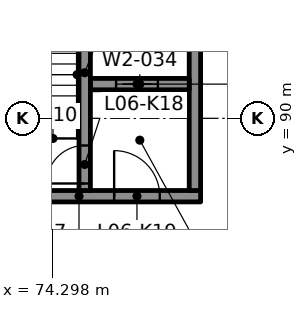
"""IFC4 building model, lengths in metres.
Left out: names, types, materials, properties, quantities, classifications, styles, units other than length and angle.
Written with IfcOpenShell. Run it as: python <this file> out.ifc"""

import sys

from ifc_helpers import new_model, si_unit, direction, frame, frame_2d, origin, place, context, subcontext, project, spatial, rectangle, extrude, element, fill, save


model = new_model("IFC4")
c1 = context("Model", 3, precision=1e-05, world=origin(), true_north=direction((0.0, 1.0)))
c2 = subcontext(c1, "Body", "Model", "MODEL_VIEW")
j1 = project(units=[si_unit("LENGTHUNIT", "METRE"), si_unit("PLANEANGLEUNIT", "RADIAN")], contexts=[c1])
p1 = place(None, origin())
s1 = spatial("IfcSite", under=j1, at=p1, CompositionType="ELEMENT")
p2 = place(p1, origin())
s2 = spatial("IfcBuilding", under=s1, at=p2, CompositionType="ELEMENT")
p3 = place(p2, frame((0.0, 0.0, 31.0)))
s3 = spatial("IfcBuildingStorey", under=s2, at=p3, CompositionType="ELEMENT", Elevation=31.0)
p4 = place(p3, frame((71.8, 87.95, 0.0), z_axis=(0.0, 0.0, 1.0), x_axis=(1.0, 0.0, 0.0)))
e1 = element("IfcWall", 1, at=p4, inside=s3, PredefinedType="SHEAR", context=c2, shape_type="SweptSolid", body=[
    extrude(rectangle(XDim=6.4, YDim=0.3, at=frame_2d((3.2, 0.0))), origin(), (0.0, 0.0, 1.0), 4.05),
])
p5 = place(p4, frame((1.325, 0.0, 0.0)))
e2 = element("IfcOpeningElement", 2, at=p5, cuts=e1, PredefinedType="OPENING", context=c2, shape_type="SweptSolid", body=[
    extrude(rectangle(XDim=1.0, YDim=2.1, at=frame_2d((0.5, 1.05))), frame((0.0, 0.16, 0.0), z_axis=(0.0, -1.0, 0.0), x_axis=(1.0, 0.0, 0.0)), (0.0, 0.0, 1.0), 0.32),
])
p6 = place(p4, frame((4.125, 0.0, 0.0)))
e3 = element("IfcOpeningElement", 3, at=p6, cuts=e1, PredefinedType="OPENING", context=c2, shape_type="SweptSolid", body=[
    extrude(rectangle(XDim=1.2, YDim=2.1, at=frame_2d((0.6, 1.05))), frame((0.0, 0.16, 0.0), z_axis=(0.0, -1.0, 0.0), x_axis=(1.0, 0.0, 0.0)), (0.0, 0.0, 1.0), 0.32),
])
p7 = place(p3, frame((78.05, 88.1, 0.0), z_axis=(0.0, 0.0, 1.0), x_axis=(0.0, 1.0, 0.0)))
e4 = element("IfcWall", 4, at=p7, inside=s3, PredefinedType="SHEAR", context=c2, shape_type="SweptSolid", body=[
    extrude(rectangle(XDim=6.2, YDim=0.3, at=frame_2d((3.1, 0.0))), origin(), (0.0, 0.0, 1.0), 4.05),
])
p8 = place(p3, frame((75.3, 90.9, 0.0), z_axis=(0.0, 0.0, 1.0), x_axis=(1.0, 0.0, 0.0)))
e5 = element("IfcWall", 5, at=p8, inside=s3, PredefinedType="SHEAR", context=c2, shape_type="SweptSolid", body=[
    extrude(rectangle(XDim=2.6, YDim=0.3, at=frame_2d((1.3, 0.0))), origin(), (0.0, 0.0, 1.0), 4.05),
])
p9 = place(p8, frame((0.675, 0.0, 0.0)))
e6 = element("IfcOpeningElement", 6, at=p9, cuts=e5, PredefinedType="OPENING", context=c2, shape_type="SweptSolid", body=[
    extrude(rectangle(XDim=1.1, YDim=2.1, at=frame_2d((0.55, 1.05))), frame((0.0, 0.16, 0.0), z_axis=(0.0, -1.0, 0.0), x_axis=(1.0, 0.0, 0.0)), (0.0, 0.0, 1.0), 0.32),
])
p10 = place(p3, frame((75.15, 88.1, 0.0), z_axis=(0.0, 0.0, 1.0), x_axis=(0.0, 1.0, 0.0)))
e7 = element("IfcWall", 7, at=p10, inside=s3, PredefinedType="SHEAR", context=c2, shape_type="SweptSolid", body=[
    extrude(rectangle(XDim=6.2, YDim=0.3, at=frame_2d((3.1, 0.0))), origin(), (0.0, 0.0, 1.0), 4.05),
])
p11 = place(p10, frame((0.185, 0.0, 0.0)))
e8 = element("IfcOpeningElement", 8, at=p11, cuts=e7, PredefinedType="OPENING", context=c2, shape_type="SweptSolid", body=[
    extrude(rectangle(XDim=1.0, YDim=2.1, at=frame_2d((0.5, 1.05))), frame((0.0, 0.16, 0.0), z_axis=(0.0, -1.0, 0.0), x_axis=(1.0, 0.0, 0.0)), (0.0, 0.0, 1.0), 0.32),
])
p12 = place(p3, frame((107.504, 60.451, 0.0), z_axis=(0.0, 0.0, 1.0), x_axis=(-0.500000550228, 0.86602508611, 0.0)))
e9 = element("IfcWall", 9, at=p12, inside=s3, PredefinedType="SOLIDWALL", context=c2, shape_type="SweptSolid", body=[
    extrude(rectangle(XDim=57.704, YDim=0.3, at=frame_2d((28.852, 0.0))), origin(), (0.0, 0.0, 1.0), 4.05),
])
p13 = place(p12, frame((0.89, 0.0, 0.8)))
e10 = element("IfcOpeningElement", 10, at=p13, cuts=e9, PredefinedType="OPENING", context=c2, shape_type="SweptSolid", body=[
    extrude(rectangle(XDim=3.0, YDim=2.4, at=frame_2d((1.5, 1.2))), frame((0.0, 0.16, 0.0), z_axis=(0.0, -1.0, 0.0), x_axis=(1.0, 0.0, 0.0)), (0.0, 0.0, 1.0), 0.32),
])
p14 = place(p12, frame((4.67, 0.0, 0.8)))
e11 = element("IfcOpeningElement", 11, at=p14, cuts=e9, PredefinedType="OPENING", context=c2, shape_type="SweptSolid", body=[
    extrude(rectangle(XDim=3.0, YDim=2.4, at=frame_2d((1.5, 1.2))), frame((0.0, 0.16, 0.0), z_axis=(0.0, -1.0, 0.0), x_axis=(1.0, 0.0, 0.0)), (0.0, 0.0, 1.0), 0.32),
])
p15 = place(p12, frame((8.451, 0.0, 0.8)))
e12 = element("IfcOpeningElement", 12, at=p15, cuts=e9, PredefinedType="OPENING", context=c2, shape_type="SweptSolid", body=[
    extrude(rectangle(XDim=3.0, YDim=2.4, at=frame_2d((1.5, 1.2))), frame((0.0, 0.16, 0.0), z_axis=(0.0, -1.0, 0.0), x_axis=(1.0, 0.0, 0.0)), (0.0, 0.0, 1.0), 0.32),
])
p16 = place(p12, frame((12.231, 0.0, 0.8)))
e13 = element("IfcOpeningElement", 13, at=p16, cuts=e9, PredefinedType="OPENING", context=c2, shape_type="SweptSolid", body=[
    extrude(rectangle(XDim=3.0, YDim=2.4, at=frame_2d((1.5, 1.2))), frame((0.0, 0.16, 0.0), z_axis=(0.0, -1.0, 0.0), x_axis=(1.0, 0.0, 0.0)), (0.0, 0.0, 1.0), 0.32),
])
p17 = place(p12, frame((16.011, 0.0, 0.8)))
e14 = element("IfcOpeningElement", 14, at=p17, cuts=e9, PredefinedType="OPENING", context=c2, shape_type="SweptSolid", body=[
    extrude(rectangle(XDim=3.0, YDim=2.4, at=frame_2d((1.5, 1.2))), frame((0.0, 0.16, 0.0), z_axis=(0.0, -1.0, 0.0), x_axis=(1.0, 0.0, 0.0)), (0.0, 0.0, 1.0), 0.32),
])
p18 = place(p12, frame((19.792, 0.0, 0.8)))
e15 = element("IfcOpeningElement", 15, at=p18, cuts=e9, PredefinedType="OPENING", context=c2, shape_type="SweptSolid", body=[
    extrude(rectangle(XDim=3.0, YDim=2.4, at=frame_2d((1.5, 1.2))), frame((0.0, 0.16, 0.0), z_axis=(0.0, -1.0, 0.0), x_axis=(1.0, 0.0, 0.0)), (0.0, 0.0, 1.0), 0.32),
])
p19 = place(p12, frame((23.572, 0.0, 0.8)))
e16 = element("IfcOpeningElement", 16, at=p19, cuts=e9, PredefinedType="OPENING", context=c2, shape_type="SweptSolid", body=[
    extrude(rectangle(XDim=3.0, YDim=2.4, at=frame_2d((1.5, 1.2))), frame((0.0, 0.16, 0.0), z_axis=(0.0, -1.0, 0.0), x_axis=(1.0, 0.0, 0.0)), (0.0, 0.0, 1.0), 0.32),
])
p20 = place(p12, frame((27.352, 0.0, 0.8)))
e17 = element("IfcOpeningElement", 17, at=p20, cuts=e9, PredefinedType="OPENING", context=c2, shape_type="SweptSolid", body=[
    extrude(rectangle(XDim=3.0, YDim=2.4, at=frame_2d((1.5, 1.2))), frame((0.0, 0.16, 0.0), z_axis=(0.0, -1.0, 0.0), x_axis=(1.0, 0.0, 0.0)), (0.0, 0.0, 1.0), 0.32),
])
p21 = place(p12, frame((31.132, 0.0, 0.8)))
e18 = element("IfcOpeningElement", 18, at=p21, cuts=e9, PredefinedType="OPENING", context=c2, shape_type="SweptSolid", body=[
    extrude(rectangle(XDim=3.0, YDim=2.4, at=frame_2d((1.5, 1.2))), frame((0.0, 0.16, 0.0), z_axis=(0.0, -1.0, 0.0), x_axis=(1.0, 0.0, 0.0)), (0.0, 0.0, 1.0), 0.32),
])
p22 = place(p12, frame((34.913, 0.0, 0.8)))
e19 = element("IfcOpeningElement", 19, at=p22, cuts=e9, PredefinedType="OPENING", context=c2, shape_type="SweptSolid", body=[
    extrude(rectangle(XDim=3.0, YDim=2.4, at=frame_2d((1.5, 1.2))), frame((0.0, 0.16, 0.0), z_axis=(0.0, -1.0, 0.0), x_axis=(1.0, 0.0, 0.0)), (0.0, 0.0, 1.0), 0.32),
])
p23 = place(p12, frame((38.693, 0.0, 0.8)))
e20 = element("IfcOpeningElement", 20, at=p23, cuts=e9, PredefinedType="OPENING", context=c2, shape_type="SweptSolid", body=[
    extrude(rectangle(XDim=3.0, YDim=2.4, at=frame_2d((1.5, 1.2))), frame((0.0, 0.16, 0.0), z_axis=(0.0, -1.0, 0.0), x_axis=(1.0, 0.0, 0.0)), (0.0, 0.0, 1.0), 0.32),
])
p24 = place(p12, frame((42.473, 0.0, 0.8)))
e21 = element("IfcOpeningElement", 21, at=p24, cuts=e9, PredefinedType="OPENING", context=c2, shape_type="SweptSolid", body=[
    extrude(rectangle(XDim=3.0, YDim=2.4, at=frame_2d((1.5, 1.2))), frame((0.0, 0.16, 0.0), z_axis=(0.0, -1.0, 0.0), x_axis=(1.0, 0.0, 0.0)), (0.0, 0.0, 1.0), 0.32),
])
p25 = place(p12, frame((46.253, 0.0, 0.8)))
e22 = element("IfcOpeningElement", 22, at=p25, cuts=e9, PredefinedType="OPENING", context=c2, shape_type="SweptSolid", body=[
    extrude(rectangle(XDim=3.0, YDim=2.4, at=frame_2d((1.5, 1.2))), frame((0.0, 0.16, 0.0), z_axis=(0.0, -1.0, 0.0), x_axis=(1.0, 0.0, 0.0)), (0.0, 0.0, 1.0), 0.32),
])
p26 = place(p12, frame((50.033, 0.0, 0.8)))
e23 = element("IfcOpeningElement", 23, at=p26, cuts=e9, PredefinedType="OPENING", context=c2, shape_type="SweptSolid", body=[
    extrude(rectangle(XDim=3.0, YDim=2.4, at=frame_2d((1.5, 1.2))), frame((0.0, 0.16, 0.0), z_axis=(0.0, -1.0, 0.0), x_axis=(1.0, 0.0, 0.0)), (0.0, 0.0, 1.0), 0.32),
])
p27 = place(p12, frame((53.814, 0.0, 0.8)))
e24 = element("IfcOpeningElement", 24, at=p27, cuts=e9, PredefinedType="OPENING", context=c2, shape_type="SweptSolid", body=[
    extrude(rectangle(XDim=3.0, YDim=2.4, at=frame_2d((1.5, 1.2))), frame((0.0, 0.16, 0.0), z_axis=(0.0, -1.0, 0.0), x_axis=(1.0, 0.0, 0.0)), (0.0, 0.0, 1.0), 0.32),
])
p28 = place(p9, origin())
e25 = element("IfcDoor", 25, at=p28, inside=s3, OperationType="DOUBLE_DOOR_SLIDING", PredefinedType="DOOR", context=c2, shape_type="SweptSolid", body=[
    extrude(rectangle(XDim=1.1, YDim=2.1, at=frame_2d((0.55, 1.05))), frame((0.0, 0.025, 0.0), z_axis=(0.0, -1.0, 0.0), x_axis=(1.0, 0.0, 0.0)), (0.0, 0.0, 1.0), 0.05),
])
fill(e6, e25)
p29 = place(p11, origin())
e26 = element("IfcDoor", 26, at=p29, inside=s3, OperationType="SINGLE_SWING_LEFT", PredefinedType="DOOR", context=c2, shape_type="SweptSolid", body=[
    extrude(rectangle(XDim=1.0, YDim=2.1, at=frame_2d((0.5, 1.05))), frame((0.0, 0.025, 0.0), z_axis=(0.0, -1.0, 0.0), x_axis=(1.0, 0.0, 0.0)), (0.0, 0.0, 1.0), 0.05),
])
fill(e8, e26)
p30 = place(p6, origin())
e27 = element("IfcDoor", 27, at=p30, inside=s3, OperationType="SINGLE_SWING_RIGHT", PredefinedType="DOOR", context=c2, shape_type="SweptSolid", body=[
    extrude(rectangle(XDim=1.2, YDim=2.1, at=frame_2d((0.6, 1.05))), frame((0.0, 0.025, 0.0), z_axis=(0.0, -1.0, 0.0), x_axis=(1.0, 0.0, 0.0)), (0.0, 0.0, 1.0), 0.05),
])
fill(e3, e27)
save(model, sys.argv[1])
